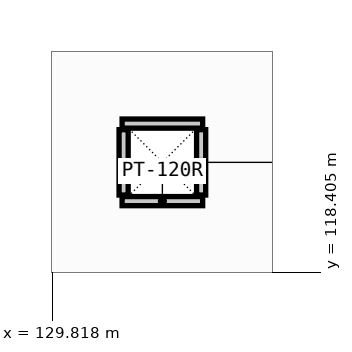
"""IFC4 building model, lengths in metres.
Left out: names, types, materials, properties, quantities, classifications, styles, units other than length and angle.
Written with IfcOpenShell. Run it as: python <this file> out.ifc"""

import sys

from ifc_helpers import new_model, si_unit, direction, frame, frame_2d, origin, place, context, subcontext, project, spatial, rectangle, extrude, element, save


model = new_model("IFC4")
c1 = context("Model", 3, precision=1e-05, world=origin(), true_north=direction((0.0, 1.0)))
c2 = subcontext(c1, "Body", "Model", "MODEL_VIEW")
j1 = project(units=[si_unit("LENGTHUNIT", "METRE"), si_unit("PLANEANGLEUNIT", "RADIAN")], contexts=[c1])
p1 = place(None, origin())
s1 = spatial("IfcSite", under=j1, at=p1, CompositionType="ELEMENT")
p2 = place(p1, origin())
s2 = spatial("IfcBuilding", under=s1, at=p2, CompositionType="ELEMENT")
p3 = place(p2, frame((0.0, 0.0, 9.0)))
s3 = spatial("IfcBuildingStorey", under=s2, at=p3, CompositionType="ELEMENT", Elevation=9.0)
for number, where, z_axis, x_axis in (
    (1, (130.74, 119.34, 0.0), (0.0, 0.0, 1.0), (1.0, 0.0, 0.0)),
    (2, (130.74, 120.36, 0.0), (0.0, 0.0, 1.0), (1.0, 0.0, 0.0)),
):
    element("IfcWall", number, at=place(p3, frame(where, z_axis=z_axis, x_axis=x_axis)), inside=s3, PredefinedType="PARTITIONING", context=c2, shape_type="SweptSolid", body=[
        extrude(rectangle(XDim=1.06, YDim=0.12, at=frame_2d((0.53, 0.0))), origin(), (0.0, 0.0, 1.0), 2.95),
    ])
for number, where, z_axis, x_axis in (
    (3, (130.76, 119.42, 0.0), (0.0, 0.0, 1.0), (0.0, 1.0, 0.0)),
    (4, (131.78, 119.42, 0.0), (0.0, 0.0, 1.0), (0.0, 1.0, 0.0)),
):
    element("IfcWall", number, at=place(p3, frame(where, z_axis=z_axis, x_axis=x_axis)), inside=s3, PredefinedType="PARTITIONING", context=c2, shape_type="SweptSolid", body=[
        extrude(rectangle(XDim=0.86, YDim=0.12, at=frame_2d((0.43, 0.0))), origin(), (0.0, 0.0, 1.0), 2.95),
    ])
save(model, sys.argv[1])
